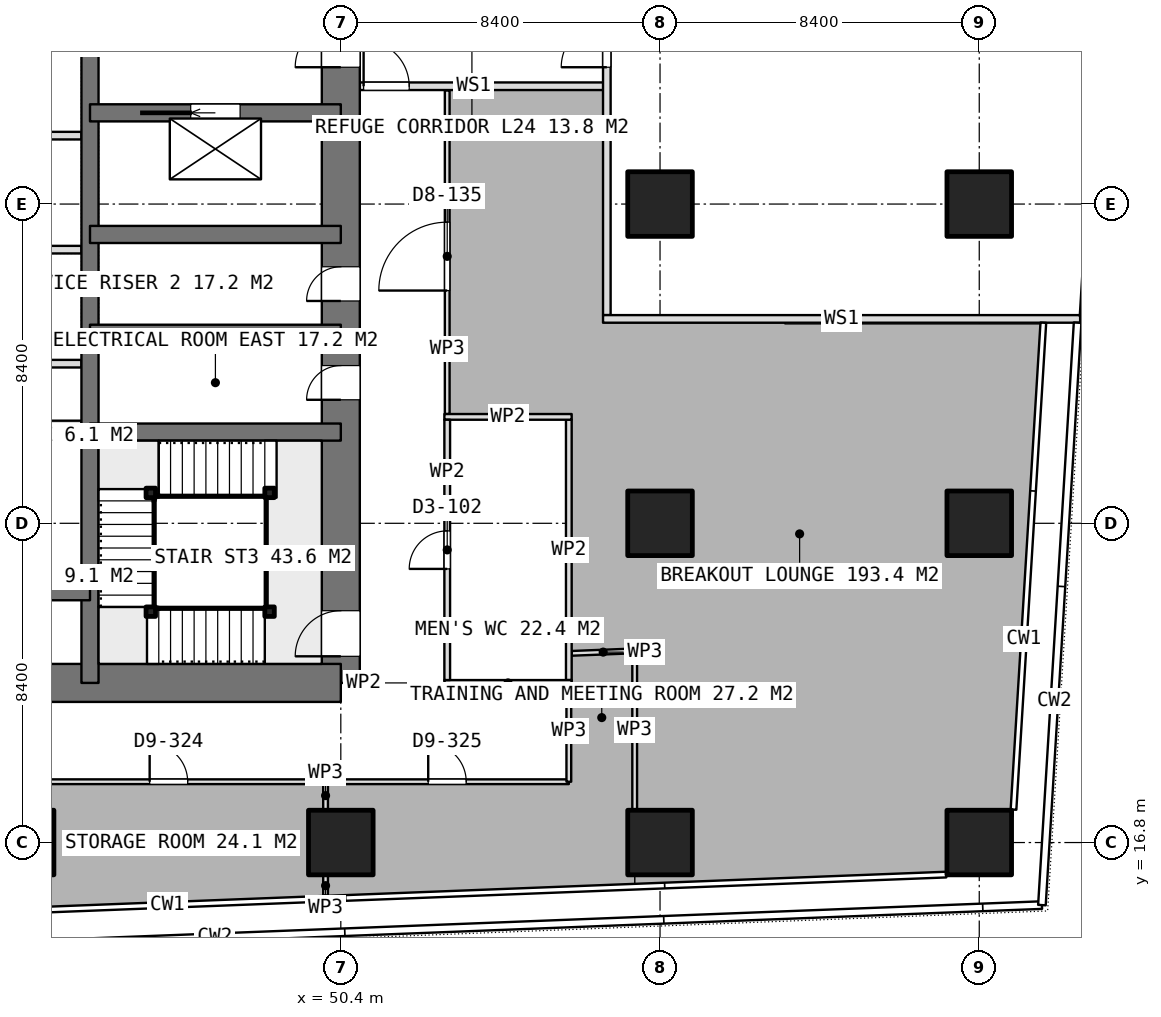
"""IFC4 building model, lengths in metres.
Left out: names, types, materials, properties, quantities, classifications, styles, units other than length and angle.
Written with IfcOpenShell. Run it as: python <this file> out.ifc"""

import sys

from ifc_helpers import new_model, si_unit, direction, frame, frame_2d, origin, origin_2d, place, context, subcontext, project, spatial, rectangle, extrude, element, fill, save


model = new_model("IFC4")
c1 = context("Model", 3, precision=1e-05, world=origin(), true_north=direction((0.0, 1.0)))
c2 = subcontext(c1, "Body", "Model", "MODEL_VIEW")
j1 = project(units=[si_unit("LENGTHUNIT", "METRE"), si_unit("PLANEANGLEUNIT", "RADIAN")], contexts=[c1])
p1 = place(None, origin())
s1 = spatial("IfcSite", under=j1, at=p1, CompositionType="ELEMENT")
p2 = place(p1, origin())
s2 = spatial("IfcBuilding", under=s1, at=p2, CompositionType="ELEMENT")
p3 = place(p2, frame((0.0, 0.0, 99.05)))
s3 = spatial("IfcBuildingStorey", under=s2, at=p3, CompositionType="ELEMENT", Elevation=99.05)
p4 = place(p3, frame((40.0, 21.0, 0.0), z_axis=(0.0, 0.0, 1.0), x_axis=(1.0, 0.0, 0.0)))
e1 = element("IfcWall", 1, at=p4, inside=s3, PredefinedType="SHEAR", context=c2, shape_type="SweptSolid", body=[
    extrude(rectangle(XDim=10.4, YDim=1.0, at=frame_2d((5.2, 0.0))), origin(), (0.0, 0.0, 1.0), 3.75),
])
p5 = place(p3, frame((50.4, 21.0, 0.0), z_axis=(0.0, 0.0, 1.0), x_axis=(0.0, 1.0, 0.0)))
e2 = element("IfcWall", 2, at=p5, inside=s3, PredefinedType="SHEAR", context=c2, shape_type="SweptSolid", body=[
    extrude(rectangle(XDim=25.2, YDim=1.0, at=frame_2d((12.6, 0.0))), origin(), (0.0, 0.0, 1.0), 3.75),
])
p6 = place(p5, frame((16.2, 0.0, 0.0)))
e3 = element("IfcOpeningElement", 3, at=p6, cuts=e2, PredefinedType="OPENING", context=c2, shape_type="SweptSolid", body=[
    extrude(rectangle(XDim=1.2, YDim=2.1, at=frame_2d((0.6, 1.05))), frame((0.0, 0.51, 0.0), z_axis=(0.0, -1.0, 0.0), x_axis=(1.0, 0.0, 0.0)), (0.0, 0.0, 1.0), 1.02),
])
p7 = place(p5, frame((10.05, 0.0, 0.0)))
e4 = element("IfcOpeningElement", 4, at=p7, cuts=e2, PredefinedType="OPENING", context=c2, shape_type="SweptSolid", body=[
    extrude(rectangle(XDim=0.9, YDim=2.1, at=frame_2d((0.45, 1.05))), frame((0.0, 0.51, 0.0), z_axis=(0.0, -1.0, 0.0), x_axis=(1.0, 0.0, 0.0)), (0.0, 0.0, 1.0), 1.02),
])
p8 = place(p5, frame((7.45, 0.0, 0.0)))
e5 = element("IfcOpeningElement", 5, at=p8, cuts=e2, PredefinedType="OPENING", context=c2, shape_type="SweptSolid", body=[
    extrude(rectangle(XDim=0.9, YDim=2.1, at=frame_2d((0.45, 1.05))), frame((0.0, 0.51, 0.0), z_axis=(0.0, -1.0, 0.0), x_axis=(1.0, 0.0, 0.0)), (0.0, 0.0, 1.0), 1.02),
])
p9 = place(p5, frame((0.7, 0.0, 0.0)))
e6 = element("IfcOpeningElement", 6, at=p9, cuts=e2, PredefinedType="OPENING", context=c2, shape_type="SweptSolid", body=[
    extrude(rectangle(XDim=1.2, YDim=2.1, at=frame_2d((0.6, 1.05))), frame((0.0, 0.51, 0.0), z_axis=(0.0, -1.0, 0.0), x_axis=(1.0, 0.0, 0.0)), (0.0, 0.0, 1.0), 1.02),
])
p10 = place(p3, frame((43.8, 21.0, 0.0), z_axis=(0.0, 0.0, 1.0), x_axis=(0.0, 1.0, 0.0)))
e7 = element("IfcWall", 7, at=p10, inside=s3, PredefinedType="SHEAR", context=c2, shape_type="SweptSolid", body=[
    extrude(rectangle(XDim=25.2, YDim=0.45, at=frame_2d((12.6, 0.0))), origin(), (0.0, 0.0, 1.0), 3.75),
])
p11 = place(p3, frame((40.0, 23.4, 0.0), z_axis=(0.0, 0.0, 1.0), x_axis=(1.0, 0.0, 0.0)))
e8 = element("IfcWall", 8, at=p11, inside=s3, PredefinedType="SHEAR", context=c2, shape_type="SweptSolid", body=[
    extrude(rectangle(XDim=3.8, YDim=0.45, at=frame_2d((1.9, 0.0))), origin(), (0.0, 0.0, 1.0), 3.75),
])
for number, where, z_axis, x_axis in (
    (9, (43.8, 27.6, 0.0), (0.0, 0.0, 1.0), (1.0, 0.0, 0.0)),
    (10, (43.8, 30.2, 0.0), (0.0, 0.0, 1.0), (1.0, 0.0, 0.0)),
    (11, (43.8, 32.8, 0.0), (0.0, 0.0, 1.0), (1.0, 0.0, 0.0)),
):
    element("IfcWall", number, at=place(p3, frame(where, z_axis=z_axis, x_axis=x_axis)), inside=s3, PredefinedType="SHEAR", context=c2, shape_type="SweptSolid", body=[
        extrude(rectangle(XDim=6.6, YDim=0.45, at=frame_2d((3.3, 0.0))), origin(), (0.0, 0.0, 1.0), 3.75),
    ])
p12 = place(p3, frame((43.8, 36.0, 0.0), z_axis=(0.0, 0.0, 1.0), x_axis=(1.0, 0.0, 0.0)))
e12 = element("IfcWall", 12, at=p12, inside=s3, PredefinedType="SHEAR", context=c2, shape_type="SweptSolid", body=[
    extrude(rectangle(XDim=6.6, YDim=0.45, at=frame_2d((3.3, 0.0))), origin(), (0.0, 0.0, 1.0), 3.75),
])
p13 = place(p12, frame((2.65, 0.0, 0.0)))
e13 = element("IfcOpeningElement", 13, at=p13, cuts=e12, PredefinedType="OPENING", context=c2, shape_type="SweptSolid", body=[
    extrude(rectangle(XDim=1.3, YDim=2.1, at=frame_2d((0.65, 1.05))), frame((0.0, 0.235, 0.0), z_axis=(0.0, -1.0, 0.0), x_axis=(1.0, 0.0, 0.0)), (0.0, 0.0, 1.0), 0.47),
])
for number, where, z_axis, x_axis in (
    (14, (42.0, 16.8, 0.0), (0.0, 0.0, 1.0), (1.0, 0.0, 0.0)),
    (15, (50.4, 16.8, 0.0), (0.0, 0.0, 1.0), (1.0, 0.0, 0.0)),
    (16, (58.8, 16.8, 0.0), (0.0, 0.0, 1.0), (1.0, 0.0, 0.0)),
    (17, (58.8, 25.2, 0.0), (0.0, 0.0, 1.0), (1.0, 0.0, 0.0)),
    (18, (58.8, 33.6, 0.0), (0.0, 0.0, 1.0), (1.0, 0.0, 0.0)),
    (19, (67.2, 16.8, 0.0), (0.0, 0.0, 1.0), (1.0, 0.0, 0.0)),
    (20, (67.2, 25.2, 0.0), (0.0, 0.0, 1.0), (1.0, 0.0, 0.0)),
    (21, (67.2, 33.6, 0.0), (0.0, 0.0, 1.0), (1.0, 0.0, 0.0)),
):
    element("IfcColumn", number, at=place(p3, frame(where, z_axis=z_axis, x_axis=x_axis)), inside=s3, PredefinedType="COLUMN", context=c2, shape_type="SweptSolid", body=[
        extrude(rectangle(XDim=1.7, YDim=1.7, at=origin_2d()), origin(), (0.0, 0.0, 1.0), 3.75),
    ])
for number, where, z_axis, x_axis in (
    (22, (40.5, 29.4, 0.0), (0.0, 0.0, 1.0), (1.0, 0.0, 0.0)),
    (23, (40.5, 32.4, 0.0), (0.0, 0.0, 1.0), (1.0, 0.0, 0.0)),
    (24, (40.5, 35.4, 0.0), (0.0, 0.0, 1.0), (1.0, 0.0, 0.0)),
    (25, (40.5, 27.8, 0.0), (0.0, 0.0, 1.0), (1.0, 0.0, 0.0)),
):
    element("IfcWall", number, at=place(p3, frame(where, z_axis=z_axis, x_axis=x_axis)), inside=s3, PredefinedType="PARTITIONING", context=c2, shape_type="SweptSolid", body=[
        extrude(rectangle(XDim=3.075, YDim=0.2, at=frame_2d((1.538, 0.0))), origin(), (0.0, 0.0, 1.0), 3.5),
    ])
for number, where, z_axis, x_axis in (
    (26, (53.125, 21.0, 0.0), (0.0, 0.0, 1.0), (1.0, 0.0, 0.0)),
    (27, (53.125, 28.0, 0.0), (0.0, 0.0, 1.0), (1.0, 0.0, 0.0)),
):
    element("IfcWall", number, at=place(p3, frame(where, z_axis=z_axis, x_axis=x_axis)), inside=s3, PredefinedType="PARTITIONING", context=c2, shape_type="SweptSolid", body=[
        extrude(rectangle(XDim=3.35, YDim=0.15, at=frame_2d((1.675, 0.0))), origin(), (0.0, 0.0, 1.0), 3.5),
    ])
p14 = place(p3, frame((53.2, 21.075, 0.0), z_axis=(0.0, 0.0, 1.0), x_axis=(0.0, 1.0, 0.0)))
e28 = element("IfcWall", 28, at=p14, inside=s3, PredefinedType="PARTITIONING", context=c2, shape_type="SweptSolid", body=[
    extrude(rectangle(XDim=6.85, YDim=0.15, at=frame_2d((3.425, 0.0))), origin(), (0.0, 0.0, 1.0), 3.5),
])
p15 = place(p14, frame((2.925, 0.0, 0.0)))
e29 = element("IfcOpeningElement", 29, at=p15, cuts=e28, PredefinedType="OPENING", context=c2, shape_type="SweptSolid", body=[
    extrude(rectangle(XDim=1.0, YDim=2.1, at=frame_2d((0.5, 1.05))), frame((0.0, 0.085, 0.0), z_axis=(0.0, -1.0, 0.0), x_axis=(1.0, 0.0, 0.0)), (0.0, 0.0, 1.0), 0.17),
])
p16 = place(p3, frame((56.4, 21.075, 0.0), z_axis=(0.0, 0.0, 1.0), x_axis=(0.0, 1.0, 0.0)))
e30 = element("IfcWall", 30, at=p16, inside=s3, PredefinedType="PARTITIONING", context=c2, shape_type="SweptSolid", body=[
    extrude(rectangle(XDim=6.85, YDim=0.15, at=frame_2d((3.425, 0.0))), origin(), (0.0, 0.0, 1.0), 3.5),
])
p17 = place(p3, frame((53.2, 28.075, 0.0), z_axis=(0.0, 0.0, 1.0), x_axis=(0.0, 1.0, 0.0)))
e31 = element("IfcWall", 31, at=p17, inside=s3, PredefinedType="PARTITIONING", context=c2, shape_type="SweptSolid", body=[
    extrude(rectangle(XDim=8.514, YDim=0.125, at=frame_2d((4.257, 0.0))), origin(), (0.0, 0.0, 1.0), 3.5),
])
p18 = place(p17, frame((3.249, 0.0, 0.0)))
e32 = element("IfcOpeningElement", 32, at=p18, cuts=e31, PredefinedType="OPENING", context=c2, shape_type="SweptSolid", body=[
    extrude(rectangle(XDim=1.8, YDim=2.1, at=frame_2d((0.9, 1.05))), frame((0.0, 0.073, 0.0), z_axis=(0.0, -1.0, 0.0), x_axis=(1.0, 0.0, 0.0)), (0.0, 0.0, 1.0), 0.145),
])
p19 = place(p3, frame((41.741, 18.4, 0.0), z_axis=(0.0, 0.0, 1.0), x_axis=(1.0, 0.0, 0.0)))
e33 = element("IfcWall", 33, at=p19, inside=s3, PredefinedType="PARTITIONING", context=c2, shape_type="SweptSolid", body=[
    extrude(rectangle(XDim=8.258, YDim=0.125, at=frame_2d((4.129, 0.0))), origin(), (0.0, 0.0, 1.0), 3.5),
])
p20 = place(p19, frame((3.629, 0.0, 0.0)))
e34 = element("IfcOpeningElement", 34, at=p20, cuts=e33, PredefinedType="OPENING", context=c2, shape_type="SweptSolid", body=[
    extrude(rectangle(XDim=1.0, YDim=2.1, at=frame_2d((0.5, 1.05))), frame((0.0, 0.073, 0.0), z_axis=(0.0, -1.0, 0.0), x_axis=(1.0, 0.0, 0.0)), (0.0, 0.0, 1.0), 0.145),
])
p21 = place(p3, frame((49.999, 18.4, 0.0), z_axis=(0.0, 0.0, 1.0), x_axis=(0.0, -1.0, 0.0)))
e35 = element("IfcWall", 35, at=p21, inside=s3, PredefinedType="PARTITIONING", context=c2, shape_type="SweptSolid", body=[
    extrude(rectangle(XDim=0.73, YDim=0.125, at=frame_2d((0.365, 0.0))), origin(), (0.0, 0.0, 1.0), 3.5),
])
p22 = place(p3, frame((49.999, 15.93, 0.0), z_axis=(0.0, 0.0, 1.0), x_axis=(0.0, -1.0, 0.0)))
e36 = element("IfcWall", 36, at=p22, inside=s3, PredefinedType="PARTITIONING", context=c2, shape_type="SweptSolid", body=[
    extrude(rectangle(XDim=0.529, YDim=0.125, at=frame_2d((0.265, 0.0))), origin(), (0.0, 0.0, 1.0), 3.5),
])
p23 = place(p3, frame((56.475, 21.778, 0.0), z_axis=(0.0, 0.0, 1.0), x_axis=(0.999233757157, 0.039139475689, 0.0)))
e37 = element("IfcWall", 37, at=p23, inside=s3, PredefinedType="PARTITIONING", context=c2, shape_type="SweptSolid", body=[
    extrude(rectangle(XDim=1.659, YDim=0.125, at=frame_2d((0.83, 0.0))), origin(), (0.0, 0.0, 1.0), 3.5),
])
p24 = place(p3, frame((58.133, 21.843, 0.0), z_axis=(0.0, 0.0, 1.0), x_axis=(0.0, -1.0, 0.0)))
e38 = element("IfcWall", 38, at=p24, inside=s3, PredefinedType="PARTITIONING", context=c2, shape_type="SweptSolid", body=[
    extrude(rectangle(XDim=4.173, YDim=0.125, at=frame_2d((2.086, 0.0))), origin(), (0.0, 0.0, 1.0), 3.5),
])
p25 = place(p3, frame((50.0, 18.4, 0.0), z_axis=(0.0, 0.0, 1.0), x_axis=(1.0, 0.0, 0.0)))
e39 = element("IfcWall", 39, at=p25, inside=s3, PredefinedType="PARTITIONING", context=c2, shape_type="SweptSolid", body=[
    extrude(rectangle(XDim=6.4, YDim=0.125, at=frame_2d((3.2, 0.0))), origin(), (0.0, 0.0, 1.0), 3.5),
])
p26 = place(p25, frame((2.7, 0.0, 0.0)))
e40 = element("IfcOpeningElement", 40, at=p26, cuts=e39, PredefinedType="OPENING", context=c2, shape_type="SweptSolid", body=[
    extrude(rectangle(XDim=1.0, YDim=2.1, at=frame_2d((0.5, 1.05))), frame((0.0, 0.073, 0.0), z_axis=(0.0, -1.0, 0.0), x_axis=(1.0, 0.0, 0.0)), (0.0, 0.0, 1.0), 0.145),
])
p27 = place(p3, frame((56.4, 18.4, 0.0), z_axis=(0.0, 0.0, 1.0), x_axis=(0.0, 1.0, 0.0)))
e41 = element("IfcWall", 41, at=p27, inside=s3, PredefinedType="PARTITIONING", context=c2, shape_type="SweptSolid", body=[
    extrude(rectangle(XDim=2.675, YDim=0.125, at=frame_2d((1.337, 0.0))), origin(), (0.0, 0.0, 1.0), 3.5),
])
for number, where, z_axis, x_axis in (
    (42, (48.525, 22.875, 0.0), (0.0, 0.0, 1.0), (1.0, 0.0, 0.0)),
    (43, (45.4, 22.875, 0.0), (0.0, 0.0, 1.0), (1.0, 0.0, 0.0)),
    (44, (45.4, 26.0, 0.0), (0.0, 0.0, 1.0), (1.0, 0.0, 0.0)),
    (45, (48.525, 26.0, 0.0), (0.0, 0.0, 1.0), (1.0, 0.0, 0.0)),
):
    element("IfcColumn", number, at=place(p3, frame(where, z_axis=z_axis, x_axis=x_axis)), inside=s3, PredefinedType="COLUMN", context=c2, shape_type="SweptSolid", body=[
        extrude(rectangle(XDim=0.25, YDim=0.25, at=origin_2d()), origin(), (0.0, 0.0, 1.0), 3.75),
    ])
p28 = place(p3, frame((57.4, 30.678, 0.0), z_axis=(0.0, 0.0, 1.0), x_axis=(0.0, 1.0, 0.0)))
e46 = element("IfcWall", 46, at=p28, inside=s3, PredefinedType="PARTITIONING", context=c2, shape_type="SweptSolid", body=[
    extrude(rectangle(XDim=22.447, YDim=0.2, at=frame_2d((11.224, 0.0))), origin(), (0.0, 0.0, 1.0), 3.5),
])
p29 = place(p28, frame((6.522, 0.0, 0.0)))
e47 = element("IfcOpeningElement", 47, at=p29, cuts=e46, PredefinedType="OPENING", context=c2, shape_type="SweptSolid", body=[
    extrude(rectangle(XDim=1.2, YDim=2.1, at=frame_2d((0.6, 1.05))), frame((0.0, 0.11, 0.0), z_axis=(0.0, -1.0, 0.0), x_axis=(1.0, 0.0, 0.0)), (0.0, 0.0, 1.0), 0.22),
])
p30 = place(p3, frame((57.3, 30.578, 0.0), z_axis=(0.0, 0.0, 1.0), x_axis=(1.0, 0.0, 0.0)))
e48 = element("IfcWall", 48, at=p30, inside=s3, PredefinedType="PARTITIONING", context=c2, shape_type="SweptSolid", body=[
    extrude(rectangle(XDim=12.555, YDim=0.2, at=frame_2d((6.277, 0.0))), origin(), (0.0, 0.0, 1.0), 3.5),
])
p31 = place(p3, frame((50.4, 36.7, 0.0), z_axis=(0.0, 0.0, 1.0), x_axis=(1.0, 0.0, 0.0)))
e49 = element("IfcWall", 49, at=p31, inside=s3, PredefinedType="PARTITIONING", context=c2, shape_type="SweptSolid", body=[
    extrude(rectangle(XDim=7.0, YDim=0.2, at=frame_2d((3.5, 0.0))), origin(), (0.0, 0.0, 1.0), 3.5),
])
p32 = place(p31, frame((0.6, 0.0, 0.0)))
e50 = element("IfcOpeningElement", 50, at=p32, cuts=e49, PredefinedType="OPENING", context=c2, shape_type="SweptSolid", body=[
    extrude(rectangle(XDim=1.2, YDim=2.1, at=frame_2d((0.6, 1.05))), frame((0.0, 0.11, 0.0), z_axis=(0.0, -1.0, 0.0), x_axis=(1.0, 0.0, 0.0)), (0.0, 0.0, 1.0), 0.22),
])
p33 = place(p6, origin())
e51 = element("IfcDoor", 51, at=p33, inside=s3, OperationType="SINGLE_SWING_LEFT", PredefinedType="DOOR", context=c2, shape_type="SweptSolid", body=[
    extrude(rectangle(XDim=1.2, YDim=2.1, at=frame_2d((0.6, 1.05))), frame((0.0, 0.025, 0.0), z_axis=(0.0, -1.0, 0.0), x_axis=(1.0, 0.0, 0.0)), (0.0, 0.0, 1.0), 0.05),
])
fill(e3, e51)
p34 = place(p7, origin())
e52 = element("IfcDoor", 52, at=p34, inside=s3, OperationType="SINGLE_SWING_LEFT", PredefinedType="DOOR", context=c2, shape_type="SweptSolid", body=[
    extrude(rectangle(XDim=0.9, YDim=2.1, at=frame_2d((0.45, 1.05))), frame((0.0, 0.025, 0.0), z_axis=(0.0, -1.0, 0.0), x_axis=(1.0, 0.0, 0.0)), (0.0, 0.0, 1.0), 0.05),
])
fill(e4, e52)
p35 = place(p8, origin())
e53 = element("IfcDoor", 53, at=p35, inside=s3, OperationType="SINGLE_SWING_LEFT", PredefinedType="DOOR", context=c2, shape_type="SweptSolid", body=[
    extrude(rectangle(XDim=0.9, YDim=2.1, at=frame_2d((0.45, 1.05))), frame((0.0, 0.025, 0.0), z_axis=(0.0, -1.0, 0.0), x_axis=(1.0, 0.0, 0.0)), (0.0, 0.0, 1.0), 0.05),
])
fill(e5, e53)
p36 = place(p13, origin())
e54 = element("IfcDoor", 54, at=p36, inside=s3, OperationType="SLIDING_TO_LEFT", PredefinedType="USERDEFINED", context=c2, shape_type="SweptSolid", body=[
    extrude(rectangle(XDim=1.3, YDim=2.1, at=frame_2d((0.65, 1.05))), frame((0.0, 0.025, 0.0), z_axis=(0.0, -1.0, 0.0), x_axis=(1.0, 0.0, 0.0)), (0.0, 0.0, 1.0), 0.05),
])
fill(e13, e54)
p37 = place(p15, origin())
e55 = element("IfcDoor", 55, at=p37, inside=s3, OperationType="SINGLE_SWING_LEFT", PredefinedType="DOOR", context=c2, shape_type="SweptSolid", body=[
    extrude(rectangle(XDim=1.0, YDim=2.1, at=frame_2d((0.5, 1.05))), frame((0.0, 0.025, 0.0), z_axis=(0.0, -1.0, 0.0), x_axis=(1.0, 0.0, 0.0)), (0.0, 0.0, 1.0), 0.05),
])
fill(e29, e55)
p38 = place(p18, origin())
e56 = element("IfcDoor", 56, at=p38, inside=s3, OperationType="DOUBLE_DOOR_SINGLE_SWING", PredefinedType="DOOR", context=c2, shape_type="SweptSolid", body=[
    extrude(rectangle(XDim=1.8, YDim=2.1, at=frame_2d((0.9, 1.05))), frame((0.0, 0.025, 0.0), z_axis=(0.0, -1.0, 0.0), x_axis=(1.0, 0.0, 0.0)), (0.0, 0.0, 1.0), 0.05),
])
fill(e32, e56)
p39 = place(p20, origin())
e57 = element("IfcDoor", 57, at=p39, inside=s3, OperationType="SINGLE_SWING_LEFT", PredefinedType="DOOR", context=c2, shape_type="SweptSolid", body=[
    extrude(rectangle(XDim=1.0, YDim=2.1, at=frame_2d((0.5, 1.05))), frame((0.0, 0.025, 0.0), z_axis=(0.0, -1.0, 0.0), x_axis=(1.0, 0.0, 0.0)), (0.0, 0.0, 1.0), 0.05),
])
fill(e34, e57)
p40 = place(p26, origin())
e58 = element("IfcDoor", 58, at=p40, inside=s3, OperationType="SINGLE_SWING_LEFT", PredefinedType="DOOR", context=c2, shape_type="SweptSolid", body=[
    extrude(rectangle(XDim=1.0, YDim=2.1, at=frame_2d((0.5, 1.05))), frame((0.0, 0.025, 0.0), z_axis=(0.0, -1.0, 0.0), x_axis=(1.0, 0.0, 0.0)), (0.0, 0.0, 1.0), 0.05),
])
fill(e40, e58)
p41 = place(p9, origin())
e59 = element("IfcDoor", 59, at=p41, inside=s3, OperationType="SINGLE_SWING_RIGHT", PredefinedType="DOOR", context=c2, shape_type="SweptSolid", body=[
    extrude(rectangle(XDim=1.2, YDim=2.1, at=frame_2d((0.6, 1.05))), frame((0.0, 0.025, 0.0), z_axis=(0.0, -1.0, 0.0), x_axis=(1.0, 0.0, 0.0)), (0.0, 0.0, 1.0), 0.05),
])
fill(e6, e59)
p42 = place(p29, origin())
e60 = element("IfcDoor", 60, at=p42, inside=s3, OperationType="SINGLE_SWING_LEFT", PredefinedType="DOOR", context=c2, shape_type="SweptSolid", body=[
    extrude(rectangle(XDim=1.2, YDim=2.1, at=frame_2d((0.6, 1.05))), frame((0.0, 0.025, 0.0), z_axis=(0.0, -1.0, 0.0), x_axis=(1.0, 0.0, 0.0)), (0.0, 0.0, 1.0), 0.05),
])
fill(e47, e60)
p43 = place(p32, origin())
e61 = element("IfcDoor", 61, at=p43, inside=s3, OperationType="SINGLE_SWING_LEFT", PredefinedType="DOOR", context=c2, shape_type="SweptSolid", body=[
    extrude(rectangle(XDim=1.2, YDim=2.1, at=frame_2d((0.6, 1.05))), frame((0.0, 0.025, 0.0), z_axis=(0.0, -1.0, 0.0), x_axis=(1.0, 0.0, 0.0)), (0.0, 0.0, 1.0), 0.05),
])
fill(e50, e61)
save(model, sys.argv[1])
